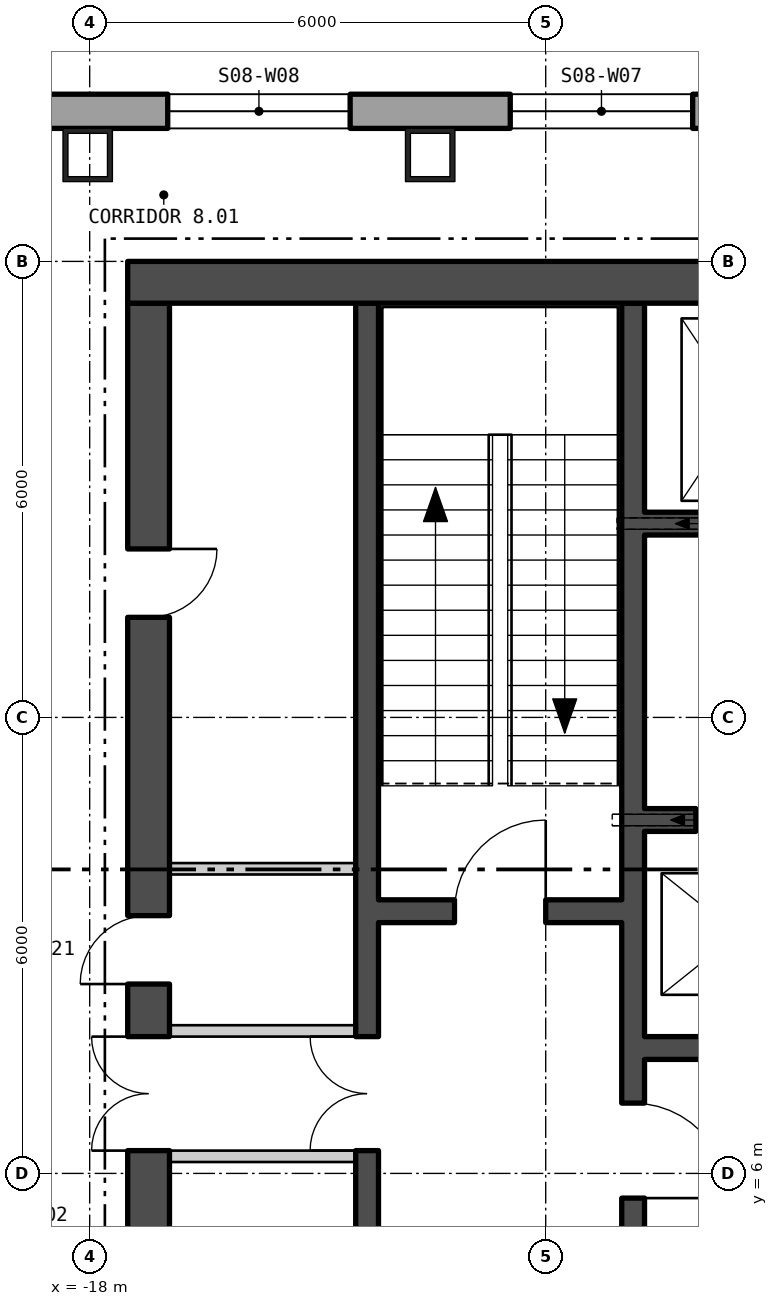
"""IFC4 building model, lengths in metres.
Left out: names, types, materials, properties, quantities, classifications, styles, units other than length and angle.
Written with IfcOpenShell. Run it as: python <this file> out.ifc"""

import sys

from ifc_helpers import new_model, si_unit, direction, frame, frame_2d, origin, origin_2d, place, context, subcontext, project, spatial, polyline, rectangle, hollow_rectangle, outline, extrude, element, fill, save


model = new_model("IFC4")
c1 = context("Model", 3, precision=1e-05, world=origin(), true_north=direction((0.0, 1.0)))
c2 = subcontext(c1, "Body", "Model", "MODEL_VIEW")
j1 = project(units=[si_unit("LENGTHUNIT", "METRE"), si_unit("PLANEANGLEUNIT", "RADIAN")], contexts=[c1])
p1 = place(None, origin())
s1 = spatial("IfcSite", under=j1, at=p1, CompositionType="ELEMENT")
p2 = place(p1, origin())
s2 = spatial("IfcBuilding", under=s1, at=p2, CompositionType="ELEMENT")
p3 = place(p2, frame((0.0, 0.0, 111.3)))
s3 = spatial("IfcBuildingStorey", under=s2, at=p3, CompositionType="ELEMENT", Elevation=111.3)
for number, where, z_axis, x_axis in (
    (1, (-13.52, 19.4, 0.0), (0.0, 0.0, 1.0), (-1.0, 0.0, 0.0)),
    (2, (-18.026, 19.4, 0.0), (0.0, 0.0, 1.0), (-1.0, 0.0, 0.0)),
):
    element("IfcColumn", number, at=place(p3, frame(where, z_axis=z_axis, x_axis=x_axis)), inside=s3, PredefinedType="COLUMN", context=c2, shape_type="SweptSolid", body=[
        extrude(hollow_rectangle(XDim=0.65, YDim=0.7, WallThickness=0.065, at=origin_2d()), origin(), (0.0, 0.0, 1.0), 4.5),
    ])
p4 = place(p3, frame((22.865, 19.975, -0.4), z_axis=(0.0, 0.0, 1.0), x_axis=(-1.0, 0.0, 0.0)))
e3 = element("IfcWall", 3, at=p4, inside=s3, PredefinedType="SOLIDWALL", context=c2, shape_type="SweptSolid", body=[
    extrude(outline(polyline([(-0.13, -0.225), (45.86, -0.225), (45.6, 0.225), (0.13, 0.225), (-0.13, -0.225)])), origin(), (0.0, 0.0, 1.0), 4.5),
])
p5 = place(p4, frame((5.892, 0.0, 1.3)))
e4 = element("IfcOpeningElement", 4, at=p5, cuts=e3, PredefinedType="OPENING", context=c2, shape_type="SweptSolid", body=[
    extrude(rectangle(XDim=2.4, YDim=2.6, at=frame_2d((1.2, 1.3))), frame((0.0, 0.235, 0.0), z_axis=(0.0, -1.0, 0.0), x_axis=(1.0, 0.0, 0.0)), (0.0, 0.0, 1.0), 0.47),
])
p6 = place(p4, frame((10.399, 0.0, 1.3)))
e5 = element("IfcOpeningElement", 5, at=p6, cuts=e3, PredefinedType="OPENING", context=c2, shape_type="SweptSolid", body=[
    extrude(rectangle(XDim=2.4, YDim=2.6, at=frame_2d((1.2, 1.3))), frame((0.0, 0.235, 0.0), z_axis=(0.0, -1.0, 0.0), x_axis=(1.0, 0.0, 0.0)), (0.0, 0.0, 1.0), 0.47),
])
p7 = place(p4, frame((14.905, 0.0, 1.3)))
e6 = element("IfcOpeningElement", 6, at=p7, cuts=e3, PredefinedType="OPENING", context=c2, shape_type="SweptSolid", body=[
    extrude(rectangle(XDim=2.4, YDim=2.6, at=frame_2d((1.2, 1.3))), frame((0.0, 0.235, 0.0), z_axis=(0.0, -1.0, 0.0), x_axis=(1.0, 0.0, 0.0)), (0.0, 0.0, 1.0), 0.47),
])
p8 = place(p4, frame((19.412, 0.0, 1.3)))
e7 = element("IfcOpeningElement", 7, at=p8, cuts=e3, PredefinedType="OPENING", context=c2, shape_type="SweptSolid", body=[
    extrude(rectangle(XDim=2.4, YDim=2.6, at=frame_2d((1.2, 1.3))), frame((0.0, 0.235, 0.0), z_axis=(0.0, -1.0, 0.0), x_axis=(1.0, 0.0, 0.0)), (0.0, 0.0, 1.0), 0.47),
])
p9 = place(p4, frame((23.918, 0.0, 1.3)))
e8 = element("IfcOpeningElement", 8, at=p9, cuts=e3, PredefinedType="OPENING", context=c2, shape_type="SweptSolid", body=[
    extrude(rectangle(XDim=2.4, YDim=2.6, at=frame_2d((1.2, 1.3))), frame((0.0, 0.235, 0.0), z_axis=(0.0, -1.0, 0.0), x_axis=(1.0, 0.0, 0.0)), (0.0, 0.0, 1.0), 0.47),
])
p10 = place(p4, frame((28.425, 0.0, 1.3)))
e9 = element("IfcOpeningElement", 9, at=p10, cuts=e3, PredefinedType="OPENING", context=c2, shape_type="SweptSolid", body=[
    extrude(rectangle(XDim=2.4, YDim=2.6, at=frame_2d((1.2, 1.3))), frame((0.0, 0.235, 0.0), z_axis=(0.0, -1.0, 0.0), x_axis=(1.0, 0.0, 0.0)), (0.0, 0.0, 1.0), 0.47),
])
p11 = place(p4, frame((32.932, 0.0, 1.3)))
e10 = element("IfcOpeningElement", 10, at=p11, cuts=e3, PredefinedType="OPENING", context=c2, shape_type="SweptSolid", body=[
    extrude(rectangle(XDim=2.4, YDim=2.6, at=frame_2d((1.2, 1.3))), frame((0.0, 0.235, 0.0), z_axis=(0.0, -1.0, 0.0), x_axis=(1.0, 0.0, 0.0)), (0.0, 0.0, 1.0), 0.47),
])
p12 = place(p4, frame((37.438, 0.0, 1.3)))
e11 = element("IfcOpeningElement", 11, at=p12, cuts=e3, PredefinedType="OPENING", context=c2, shape_type="SweptSolid", body=[
    extrude(rectangle(XDim=2.4, YDim=2.6, at=frame_2d((1.2, 1.3))), frame((0.0, 0.235, 0.0), z_axis=(0.0, -1.0, 0.0), x_axis=(1.0, 0.0, 0.0)), (0.0, 0.0, 1.0), 0.47),
])
p13 = place(p3, frame((-27.595, 11.782, -0.18), z_axis=(0.0, 0.0, 1.0), x_axis=(0.500000141277, -0.866025322218, 0.0)))
e12 = element("IfcWall", 12, at=p13, inside=s3, PredefinedType="SOLIDWALL", context=c2, shape_type="SweptSolid", body=[
    extrude(outline(polyline([(-0.13, -0.225), (45.86, -0.225), (45.6, 0.225), (0.13, 0.225), (-0.13, -0.225)])), origin(), (0.0, 0.0, 1.0), 4.28),
])
p14 = place(p13, frame((1.424, 0.0, 1.08)))
e13 = element("IfcOpeningElement", 13, at=p14, cuts=e12, PredefinedType="OPENING", context=c2, shape_type="SweptSolid", body=[
    extrude(rectangle(XDim=2.4, YDim=2.6, at=frame_2d((1.2, 1.3))), frame((0.0, 0.235, 0.0), z_axis=(0.0, -1.0, 0.0), x_axis=(1.0, 0.0, 0.0)), (0.0, 0.0, 1.0), 0.47),
])
p15 = place(p13, frame((5.892, 0.0, 1.08)))
e14 = element("IfcOpeningElement", 14, at=p15, cuts=e12, PredefinedType="OPENING", context=c2, shape_type="SweptSolid", body=[
    extrude(rectangle(XDim=2.4, YDim=2.6, at=frame_2d((1.2, 1.3))), frame((0.0, 0.235, 0.0), z_axis=(0.0, -1.0, 0.0), x_axis=(1.0, 0.0, 0.0)), (0.0, 0.0, 1.0), 0.47),
])
p16 = place(p13, frame((10.399, 0.0, 1.08)))
e15 = element("IfcOpeningElement", 15, at=p16, cuts=e12, PredefinedType="OPENING", context=c2, shape_type="SweptSolid", body=[
    extrude(rectangle(XDim=2.4, YDim=2.6, at=frame_2d((1.2, 1.3))), frame((0.0, 0.235, 0.0), z_axis=(0.0, -1.0, 0.0), x_axis=(1.0, 0.0, 0.0)), (0.0, 0.0, 1.0), 0.47),
])
p17 = place(p13, frame((14.905, 0.0, 1.08)))
e16 = element("IfcOpeningElement", 16, at=p17, cuts=e12, PredefinedType="OPENING", context=c2, shape_type="SweptSolid", body=[
    extrude(rectangle(XDim=2.4, YDim=2.6, at=frame_2d((1.2, 1.3))), frame((0.0, 0.235, 0.0), z_axis=(0.0, -1.0, 0.0), x_axis=(1.0, 0.0, 0.0)), (0.0, 0.0, 1.0), 0.47),
])
p18 = place(p13, frame((19.412, 0.0, 1.08)))
e17 = element("IfcOpeningElement", 17, at=p18, cuts=e12, PredefinedType="OPENING", context=c2, shape_type="SweptSolid", body=[
    extrude(rectangle(XDim=2.4, YDim=2.6, at=frame_2d((1.2, 1.3))), frame((0.0, 0.235, 0.0), z_axis=(0.0, -1.0, 0.0), x_axis=(1.0, 0.0, 0.0)), (0.0, 0.0, 1.0), 0.47),
])
p19 = place(p13, frame((23.918, 0.0, 1.08)))
e18 = element("IfcOpeningElement", 18, at=p19, cuts=e12, PredefinedType="OPENING", context=c2, shape_type="SweptSolid", body=[
    extrude(rectangle(XDim=2.4, YDim=2.6, at=frame_2d((1.2, 1.3))), frame((0.0, 0.235, 0.0), z_axis=(0.0, -1.0, 0.0), x_axis=(1.0, 0.0, 0.0)), (0.0, 0.0, 1.0), 0.47),
])
p20 = place(p13, frame((28.425, 0.0, 1.08)))
e19 = element("IfcOpeningElement", 19, at=p20, cuts=e12, PredefinedType="OPENING", context=c2, shape_type="SweptSolid", body=[
    extrude(rectangle(XDim=2.4, YDim=2.6, at=frame_2d((1.2, 1.3))), frame((0.0, 0.235, 0.0), z_axis=(0.0, -1.0, 0.0), x_axis=(1.0, 0.0, 0.0)), (0.0, 0.0, 1.0), 0.47),
])
p21 = place(p13, frame((32.932, 0.0, 1.08)))
e20 = element("IfcOpeningElement", 20, at=p21, cuts=e12, PredefinedType="OPENING", context=c2, shape_type="SweptSolid", body=[
    extrude(rectangle(XDim=2.4, YDim=2.6, at=frame_2d((1.2, 1.3))), frame((0.0, 0.235, 0.0), z_axis=(0.0, -1.0, 0.0), x_axis=(1.0, 0.0, 0.0)), (0.0, 0.0, 1.0), 0.47),
])
p22 = place(p13, frame((37.438, 0.0, 1.08)))
e21 = element("IfcOpeningElement", 21, at=p22, cuts=e12, PredefinedType="OPENING", context=c2, shape_type="SweptSolid", body=[
    extrude(rectangle(XDim=2.4, YDim=2.6, at=frame_2d((1.2, 1.3))), frame((0.0, 0.235, 0.0), z_axis=(0.0, -1.0, 0.0), x_axis=(1.0, 0.0, 0.0)), (0.0, 0.0, 1.0), 0.47),
])
p23 = place(p13, frame((41.907, 0.0, 1.08)))
e22 = element("IfcOpeningElement", 22, at=p23, cuts=e12, PredefinedType="OPENING", context=c2, shape_type="SweptSolid", body=[
    extrude(rectangle(XDim=2.4, YDim=2.6, at=frame_2d((1.2, 1.3))), frame((0.0, 0.235, 0.0), z_axis=(0.0, -1.0, 0.0), x_axis=(1.0, 0.0, 0.0)), (0.0, 0.0, 1.0), 0.47),
])
p24 = place(p3, frame((-17.5, 17.725, 0.0), z_axis=(0.0, 0.0, 1.0), x_axis=(1.0, 0.0, 0.0)))
e23 = element("IfcWall", 23, at=p24, inside=s3, PredefinedType="SHEAR", context=c2, shape_type="SweptSolid", body=[
    extrude(rectangle(XDim=35.0, YDim=0.55, at=frame_2d((17.5, 0.0))), origin(), (0.0, 0.0, 1.0), 4.3),
])
p25 = place(p3, frame((-17.225, 0.55, 0.0), z_axis=(0.0, 0.0, 1.0), x_axis=(0.0, 1.0, 0.0)))
e24 = element("IfcWall", 24, at=p25, inside=s3, PredefinedType="SHEAR", context=c2, shape_type="SweptSolid", body=[
    extrude(rectangle(XDim=16.9, YDim=0.55, at=frame_2d((8.45, 0.0))), origin(), (0.0, 0.0, 1.0), 4.3),
])
p26 = place(p25, frame((5.75, 0.0, 0.0)))
e25 = element("IfcOpeningElement", 25, at=p26, cuts=e24, PredefinedType="OPENING", context=c2, shape_type="SweptSolid", body=[
    extrude(rectangle(XDim=1.5, YDim=2.1, at=frame_2d((0.75, 1.05))), frame((0.0, 0.285, 0.0), z_axis=(0.0, -1.0, 0.0), x_axis=(1.0, 0.0, 0.0)), (0.0, 0.0, 1.0), 0.57),
])
p27 = place(p25, frame((0.462, 0.0, 0.0)))
e26 = element("IfcOpeningElement", 26, at=p27, cuts=e24, PredefinedType="OPENING", context=c2, shape_type="SweptSolid", body=[
    extrude(rectangle(XDim=1.0, YDim=2.1, at=frame_2d((0.5, 1.05))), frame((0.0, 0.285, 0.0), z_axis=(0.0, -1.0, 0.0), x_axis=(1.0, 0.0, 0.0)), (0.0, 0.0, 1.0), 0.57),
])
p28 = place(p25, frame((3.387, 0.0, 0.0)))
e27 = element("IfcOpeningElement", 27, at=p28, cuts=e24, PredefinedType="OPENING", context=c2, shape_type="SweptSolid", body=[
    extrude(rectangle(XDim=0.9, YDim=2.1, at=frame_2d((0.45, 1.05))), frame((0.0, 0.285, 0.0), z_axis=(0.0, -1.0, 0.0), x_axis=(1.0, 0.0, 0.0)), (0.0, 0.0, 1.0), 0.57),
])
p29 = place(p25, frame((7.942, 0.0, 0.0)))
e28 = element("IfcOpeningElement", 28, at=p29, cuts=e24, PredefinedType="OPENING", context=c2, shape_type="SweptSolid", body=[
    extrude(rectangle(XDim=0.9, YDim=2.1, at=frame_2d((0.45, 1.05))), frame((0.0, 0.285, 0.0), z_axis=(0.0, -1.0, 0.0), x_axis=(1.0, 0.0, 0.0)), (0.0, 0.0, 1.0), 0.57),
])
p30 = place(p25, frame((12.767, 0.0, 0.0)))
e29 = element("IfcOpeningElement", 29, at=p30, cuts=e24, PredefinedType="OPENING", context=c2, shape_type="SweptSolid", body=[
    extrude(rectangle(XDim=0.9, YDim=2.1, at=frame_2d((0.45, 1.05))), frame((0.0, 0.285, 0.0), z_axis=(0.0, -1.0, 0.0), x_axis=(1.0, 0.0, 0.0)), (0.0, 0.0, 1.0), 0.57),
])
p31 = place(p3, frame((-10.85, 0.55, 0.0), z_axis=(0.0, 0.0, 1.0), x_axis=(0.0, 1.0, 0.0)))
e30 = element("IfcWall", 30, at=p31, inside=s3, PredefinedType="SHEAR", context=c2, shape_type="SweptSolid", body=[
    extrude(rectangle(XDim=16.9, YDim=0.3, at=frame_2d((8.45, 0.0))), origin(), (0.0, 0.0, 1.0), 4.3),
])
p32 = place(p31, frame((5.125, 0.0, 0.0)))
e31 = element("IfcOpeningElement", 31, at=p32, cuts=e30, PredefinedType="OPENING", context=c2, shape_type="SweptSolid", body=[
    extrude(rectangle(XDim=1.25, YDim=2.1, at=frame_2d((0.625, 1.05))), frame((0.0, 0.16, 0.0), z_axis=(0.0, -1.0, 0.0), x_axis=(1.0, 0.0, 0.0)), (0.0, 0.0, 1.0), 0.32),
])
p33 = place(p31, frame((1.55, 0.0, 0.0)))
e32 = element("IfcOpeningElement", 32, at=p33, cuts=e30, PredefinedType="OPENING", context=c2, shape_type="SweptSolid", body=[
    extrude(rectangle(XDim=1.0, YDim=2.1, at=frame_2d((0.5, 1.05))), frame((0.0, 0.16, 0.0), z_axis=(0.0, -1.0, 0.0), x_axis=(1.0, 0.0, 0.0)), (0.0, 0.0, 1.0), 0.32),
])
p34 = place(p3, frame((-14.35, 0.55, 0.0), z_axis=(0.0, 0.0, 1.0), x_axis=(0.0, 1.0, 0.0)))
e33 = element("IfcWall", 33, at=p34, inside=s3, PredefinedType="SHEAR", context=c2, shape_type="SweptSolid", body=[
    extrude(rectangle(XDim=16.9, YDim=0.3, at=frame_2d((8.45, 0.0))), origin(), (0.0, 0.0, 1.0), 4.3),
])
p35 = place(p34, frame((5.75, 0.0, 0.0)))
e34 = element("IfcOpeningElement", 34, at=p35, cuts=e33, PredefinedType="OPENING", context=c2, shape_type="SweptSolid", body=[
    extrude(rectangle(XDim=1.5, YDim=2.1, at=frame_2d((0.75, 1.05))), frame((0.0, 0.16, 0.0), z_axis=(0.0, -1.0, 0.0), x_axis=(1.0, 0.0, 0.0)), (0.0, 0.0, 1.0), 0.32),
])
p36 = place(p3, frame((-14.2, 9.45, 0.0), z_axis=(0.0, 0.0, 1.0), x_axis=(1.0, 0.0, 0.0)))
e35 = element("IfcWall", 35, at=p36, inside=s3, PredefinedType="SHEAR", context=c2, shape_type="SweptSolid", body=[
    extrude(rectangle(XDim=3.2, YDim=0.3, at=frame_2d((1.6, 0.0))), origin(), (0.0, 0.0, 1.0), 4.3),
])
p37 = place(p36, frame((1.0, 0.0, 0.0)))
e36 = element("IfcOpeningElement", 36, at=p37, cuts=e35, PredefinedType="OPENING", context=c2, shape_type="SweptSolid", body=[
    extrude(rectangle(XDim=1.2, YDim=2.1, at=frame_2d((0.6, 1.05))), frame((0.0, 0.16, 0.0), z_axis=(0.0, -1.0, 0.0), x_axis=(1.0, 0.0, 0.0)), (0.0, 0.0, 1.0), 0.32),
])
p38 = place(p3, frame((-10.7, 14.55, 0.0), z_axis=(0.0, 0.0, 1.0), x_axis=(1.0, 0.0, 0.0)))
e37 = element("IfcWall", 37, at=p38, inside=s3, PredefinedType="SHEAR", context=c2, shape_type="SweptSolid", body=[
    extrude(rectangle(XDim=21.4, YDim=0.3, at=frame_2d((10.7, 0.0))), origin(), (0.0, 0.0, 1.0), 4.3),
])
p39 = place(p38, frame((0.738, 0.0, 0.0)))
e38 = element("IfcOpeningElement", 38, at=p39, cuts=e37, PredefinedType="OPENING", context=c2, shape_type="SweptSolid", body=[
    extrude(rectangle(XDim=1.1, YDim=2.1, at=frame_2d((0.55, 1.05))), frame((0.0, 0.16, 0.0), z_axis=(0.0, -1.0, 0.0), x_axis=(1.0, 0.0, 0.0)), (0.0, 0.0, 1.0), 0.32),
])
p40 = place(p38, frame((3.462, 0.0, 0.0)))
e39 = element("IfcOpeningElement", 39, at=p40, cuts=e37, PredefinedType="OPENING", context=c2, shape_type="SweptSolid", body=[
    extrude(rectangle(XDim=1.1, YDim=2.1, at=frame_2d((0.55, 1.05))), frame((0.0, 0.16, 0.0), z_axis=(0.0, -1.0, 0.0), x_axis=(1.0, 0.0, 0.0)), (0.0, 0.0, 1.0), 0.32),
])
p41 = place(p38, frame((6.138, 0.0, 0.0)))
e40 = element("IfcOpeningElement", 40, at=p41, cuts=e37, PredefinedType="OPENING", context=c2, shape_type="SweptSolid", body=[
    extrude(rectangle(XDim=1.1, YDim=2.1, at=frame_2d((0.55, 1.05))), frame((0.0, 0.16, 0.0), z_axis=(0.0, -1.0, 0.0), x_axis=(1.0, 0.0, 0.0)), (0.0, 0.0, 1.0), 0.32),
])
p42 = place(p38, frame((8.812, 0.0, 0.0)))
e41 = element("IfcOpeningElement", 41, at=p42, cuts=e37, PredefinedType="OPENING", context=c2, shape_type="SweptSolid", body=[
    extrude(rectangle(XDim=1.1, YDim=2.1, at=frame_2d((0.55, 1.05))), frame((0.0, 0.16, 0.0), z_axis=(0.0, -1.0, 0.0), x_axis=(1.0, 0.0, 0.0)), (0.0, 0.0, 1.0), 0.32),
])
p43 = place(p38, frame((14.162, 0.0, 0.0)))
e42 = element("IfcOpeningElement", 42, at=p43, cuts=e37, PredefinedType="OPENING", context=c2, shape_type="SweptSolid", body=[
    extrude(rectangle(XDim=1.1, YDim=2.1, at=frame_2d((0.55, 1.05))), frame((0.0, 0.16, 0.0), z_axis=(0.0, -1.0, 0.0), x_axis=(1.0, 0.0, 0.0)), (0.0, 0.0, 1.0), 0.32),
])
p44 = place(p38, frame((16.837, 0.0, 0.0)))
e43 = element("IfcOpeningElement", 43, at=p44, cuts=e37, PredefinedType="OPENING", context=c2, shape_type="SweptSolid", body=[
    extrude(rectangle(XDim=1.1, YDim=2.1, at=frame_2d((0.55, 1.05))), frame((0.0, 0.16, 0.0), z_axis=(0.0, -1.0, 0.0), x_axis=(1.0, 0.0, 0.0)), (0.0, 0.0, 1.0), 0.32),
])
p45 = place(p38, frame((19.562, 0.0, 0.0)))
e44 = element("IfcOpeningElement", 44, at=p45, cuts=e37, PredefinedType="OPENING", context=c2, shape_type="SweptSolid", body=[
    extrude(rectangle(XDim=1.1, YDim=2.1, at=frame_2d((0.55, 1.05))), frame((0.0, 0.16, 0.0), z_axis=(0.0, -1.0, 0.0), x_axis=(1.0, 0.0, 0.0)), (0.0, 0.0, 1.0), 0.32),
])
p46 = place(p3, frame((-10.7, 10.65, 0.0), z_axis=(0.0, 0.0, 1.0), x_axis=(1.0, 0.0, 0.0)))
e45 = element("IfcWall", 45, at=p46, inside=s3, PredefinedType="SHEAR", context=c2, shape_type="SweptSolid", body=[
    extrude(rectangle(XDim=10.3, YDim=0.3, at=frame_2d((5.15, 0.0))), origin(), (0.0, 0.0, 1.0), 4.3),
])
p47 = place(p46, frame((0.675, 0.0, 0.0)))
e46 = element("IfcOpeningElement", 46, at=p47, cuts=e45, PredefinedType="OPENING", context=c2, shape_type="SweptSolid", body=[
    extrude(rectangle(XDim=1.1, YDim=2.1, at=frame_2d((0.55, 1.05))), frame((0.0, 0.16, 0.0), z_axis=(0.0, -1.0, 0.0), x_axis=(1.0, 0.0, 0.0)), (0.0, 0.0, 1.0), 0.32),
])
p48 = place(p46, frame((3.275, 0.0, 0.0)))
e47 = element("IfcOpeningElement", 47, at=p48, cuts=e45, PredefinedType="OPENING", context=c2, shape_type="SweptSolid", body=[
    extrude(rectangle(XDim=1.1, YDim=2.1, at=frame_2d((0.55, 1.05))), frame((0.0, 0.16, 0.0), z_axis=(0.0, -1.0, 0.0), x_axis=(1.0, 0.0, 0.0)), (0.0, 0.0, 1.0), 0.32),
])
p49 = place(p46, frame((5.825, 0.0, 0.0)))
e48 = element("IfcOpeningElement", 48, at=p49, cuts=e45, PredefinedType="OPENING", context=c2, shape_type="SweptSolid", body=[
    extrude(rectangle(XDim=1.1, YDim=2.1, at=frame_2d((0.55, 1.05))), frame((0.0, 0.16, 0.0), z_axis=(0.0, -1.0, 0.0), x_axis=(1.0, 0.0, 0.0)), (0.0, 0.0, 1.0), 0.32),
])
p50 = place(p46, frame((8.375, 0.0, 0.0)))
e49 = element("IfcOpeningElement", 49, at=p50, cuts=e45, PredefinedType="OPENING", context=c2, shape_type="SweptSolid", body=[
    extrude(rectangle(XDim=1.1, YDim=2.1, at=frame_2d((0.55, 1.05))), frame((0.0, 0.16, 0.0), z_axis=(0.0, -1.0, 0.0), x_axis=(1.0, 0.0, 0.0)), (0.0, 0.0, 1.0), 0.32),
])
p51 = place(p3, frame((-10.7, 7.65, 0.0), z_axis=(0.0, 0.0, 1.0), x_axis=(1.0, 0.0, 0.0)))
e50 = element("IfcWall", 50, at=p51, inside=s3, PredefinedType="SHEAR", context=c2, shape_type="SweptSolid", body=[
    extrude(rectangle(XDim=10.3, YDim=0.3, at=frame_2d((5.15, 0.0))), origin(), (0.0, 0.0, 1.0), 4.3),
])
for number, where, z_axis, x_axis in (
    (51, (-16.95, 6.225, 0.0), (0.0, 0.0, 1.0), (1.0, 0.0, 0.0)),
    (52, (-16.95, 7.875, 0.0), (0.0, 0.0, 1.0), (1.0, 0.0, 0.0)),
    (53, (-16.95, 10.008, 0.0), (0.0, 0.0, 1.0), (1.0, 0.0, 0.0)),
):
    element("IfcWall", number, at=place(p3, frame(where, z_axis=z_axis, x_axis=x_axis)), inside=s3, PredefinedType="PARTITIONING", context=c2, shape_type="SweptSolid", body=[
        extrude(rectangle(XDim=2.45, YDim=0.15, at=frame_2d((1.225, 0.0))), origin(), (0.0, 0.0, 1.0), 4.3),
    ])
p52 = place(p11, origin())
e54 = element("IfcWindow", 54, at=p52, inside=s3, PartitioningType="SINGLE_PANEL", PredefinedType="WINDOW", context=c2, shape_type="SweptSolid", body=[
    extrude(rectangle(XDim=2.4, YDim=2.6, at=frame_2d((1.2, 1.3))), frame((0.0, 0.105, 0.0), z_axis=(0.0, -1.0, 0.0), x_axis=(1.0, 0.0, 0.0)), (0.0, 0.0, 1.0), 0.06),
])
fill(e10, e54)
p53 = place(p12, origin())
e55 = element("IfcWindow", 55, at=p53, inside=s3, PartitioningType="SINGLE_PANEL", PredefinedType="WINDOW", context=c2, shape_type="SweptSolid", body=[
    extrude(rectangle(XDim=2.4, YDim=2.6, at=frame_2d((1.2, 1.3))), frame((0.0, 0.105, 0.0), z_axis=(0.0, -1.0, 0.0), x_axis=(1.0, 0.0, 0.0)), (0.0, 0.0, 1.0), 0.06),
])
fill(e11, e55)
p54 = place(p47, origin())
e56 = element("IfcDoor", 56, at=p54, inside=s3, OperationType="SLIDING_TO_LEFT", PredefinedType="DOOR", context=c2, shape_type="SweptSolid", body=[
    extrude(rectangle(XDim=1.1, YDim=2.1, at=frame_2d((0.55, 1.05))), frame((0.0, 0.025, 0.0), z_axis=(0.0, -1.0, 0.0), x_axis=(1.0, 0.0, 0.0)), (0.0, 0.0, 1.0), 0.05),
])
fill(e46, e56)
p55 = place(p37, origin())
e57 = element("IfcDoor", 57, at=p55, inside=s3, OperationType="SINGLE_SWING_LEFT", PredefinedType="DOOR", context=c2, shape_type="SweptSolid", body=[
    extrude(rectangle(XDim=1.2, YDim=2.1, at=frame_2d((0.6, 1.05))), frame((0.0, 0.025, 0.0), z_axis=(0.0, -1.0, 0.0), x_axis=(1.0, 0.0, 0.0)), (0.0, 0.0, 1.0), 0.05),
])
fill(e36, e57)
p56 = place(p32, origin())
e58 = element("IfcDoor", 58, at=p56, inside=s3, OperationType="SINGLE_SWING_LEFT", PredefinedType="DOOR", context=c2, shape_type="SweptSolid", body=[
    extrude(rectangle(XDim=1.25, YDim=2.1, at=frame_2d((0.625, 1.05))), frame((0.0, 0.025, 0.0), z_axis=(0.0, -1.0, 0.0), x_axis=(1.0, 0.0, 0.0)), (0.0, 0.0, 1.0), 0.05),
])
fill(e31, e58)
p57 = place(p35, origin())
e59 = element("IfcDoor", 59, at=p57, inside=s3, OperationType="DOUBLE_DOOR_SINGLE_SWING", PredefinedType="DOOR", context=c2, shape_type="SweptSolid", body=[
    extrude(rectangle(XDim=1.5, YDim=2.1, at=frame_2d((0.75, 1.05))), frame((0.0, 0.025, 0.0), z_axis=(0.0, -1.0, 0.0), x_axis=(1.0, 0.0, 0.0)), (0.0, 0.0, 1.0), 0.05),
])
fill(e34, e59)
p58 = place(p26, origin())
e60 = element("IfcDoor", 60, at=p58, inside=s3, OperationType="DOUBLE_DOOR_SINGLE_SWING", PredefinedType="DOOR", context=c2, shape_type="SweptSolid", body=[
    extrude(rectangle(XDim=1.5, YDim=2.1, at=frame_2d((0.75, 1.05))), frame((0.0, 0.025, 0.0), z_axis=(0.0, -1.0, 0.0), x_axis=(1.0, 0.0, 0.0)), (0.0, 0.0, 1.0), 0.05),
])
fill(e25, e60)
p59 = place(p29, origin())
e61 = element("IfcDoor", 61, at=p59, inside=s3, OperationType="SINGLE_SWING_RIGHT", PredefinedType="DOOR", context=c2, shape_type="SweptSolid", body=[
    extrude(rectangle(XDim=0.9, YDim=2.1, at=frame_2d((0.45, 1.05))), frame((0.0, 0.025, 0.0), z_axis=(0.0, -1.0, 0.0), x_axis=(1.0, 0.0, 0.0)), (0.0, 0.0, 1.0), 0.05),
])
fill(e28, e61)
p60 = place(p30, origin())
e62 = element("IfcDoor", 62, at=p60, inside=s3, OperationType="SINGLE_SWING_RIGHT", PredefinedType="DOOR", context=c2, shape_type="SweptSolid", body=[
    extrude(rectangle(XDim=0.9, YDim=2.1, at=frame_2d((0.45, 1.05))), frame((0.0, 0.025, 0.0), z_axis=(0.0, -1.0, 0.0), x_axis=(1.0, 0.0, 0.0)), (0.0, 0.0, 1.0), 0.05),
])
fill(e29, e62)
save(model, sys.argv[1])
